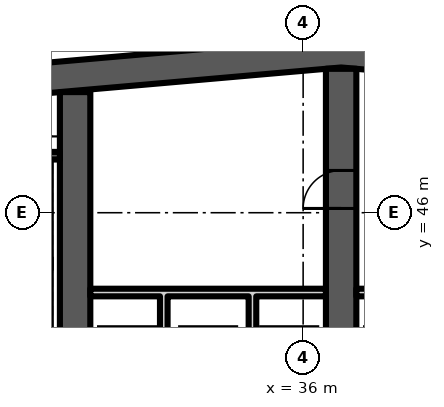
"""IFC4 building model, lengths in metres.
Left out: names, types, materials, properties, quantities, classifications, styles, units other than length and angle.
Written with IfcOpenShell. Run it as: python <this file> out.ifc"""

import sys

from ifc_helpers import new_model, si_unit, direction, frame, frame_2d, origin, place, context, subcontext, project, spatial, polyline, rectangle, outline, extrude, element, fill, save


model = new_model("IFC4")
c1 = context("Model", 3, precision=1e-05, world=origin(), true_north=direction((0.0, 1.0)))
c2 = subcontext(c1, "Body", "Model", "MODEL_VIEW")
j1 = project(units=[si_unit("LENGTHUNIT", "METRE"), si_unit("PLANEANGLEUNIT", "RADIAN")], contexts=[c1])
p1 = place(None, origin())
s1 = spatial("IfcSite", under=j1, at=p1, CompositionType="ELEMENT")
p2 = place(p1, origin())
s2 = spatial("IfcBuilding", under=s1, at=p2, CompositionType="ELEMENT")
p3 = place(p2, frame((0.0, 0.0, 151.9)))
s3 = spatial("IfcBuildingStorey", under=s2, at=p3, CompositionType="ELEMENT", Elevation=151.9)
p4 = place(p3, origin())
e1 = element("IfcWall", 1, at=p4, inside=s3, PredefinedType="SHEAR", context=c2, shape_type="SweptSolid", body=[
    extrude(outline(polyline([(16.0, 47.984), (37.0, 49.822), (58.0, 47.984), (58.0, 48.787), (37.0, 50.625), (16.0, 48.787), (16.0, 47.984)])), origin(), (0.0, 0.0, 1.0), 3.6),
])
p5 = place(p3, frame((30.0, 34.8, 0.0), z_axis=(0.0, 0.0, 1.0), x_axis=(0.0, 1.0, 0.0)))
e2 = element("IfcWall", 2, at=p5, inside=s3, PredefinedType="SHEAR", context=c2, shape_type="SweptSolid", body=[
    extrude(rectangle(XDim=14.374, YDim=0.8, at=frame_2d((7.187, 0.0))), origin(), (0.0, 0.0, 1.0), 3.6),
])
p6 = place(p5, frame((3.6, 0.0, 0.0)))
e3 = element("IfcOpeningElement", 3, at=p6, cuts=e2, PredefinedType="OPENING", context=c2, shape_type="SweptSolid", body=[
    extrude(rectangle(XDim=1.1, YDim=2.1, at=frame_2d((0.55, 1.05))), frame((0.0, 0.41, 0.0), z_axis=(0.0, -1.0, 0.0), x_axis=(1.0, 0.0, 0.0)), (0.0, 0.0, 1.0), 0.82),
])
p7 = place(p3, frame((37.0, 34.8, 0.0), z_axis=(0.0, 0.0, 1.0), x_axis=(0.0, 1.0, 0.0)))
e4 = element("IfcWall", 4, at=p7, inside=s3, PredefinedType="SHEAR", context=c2, shape_type="SweptSolid", body=[
    extrude(rectangle(XDim=14.987, YDim=0.8, at=frame_2d((7.493, 0.0))), origin(), (0.0, 0.0, 1.0), 3.6),
])
p8 = place(p7, frame((11.312, 0.0, 0.0)))
e5 = element("IfcOpeningElement", 5, at=p8, cuts=e4, PredefinedType="OPENING", context=c2, shape_type="SweptSolid", body=[
    extrude(rectangle(XDim=1.0, YDim=2.1, at=frame_2d((0.5, 1.05))), frame((0.0, 0.41, 0.0), z_axis=(0.0, -1.0, 0.0), x_axis=(1.0, 0.0, 0.0)), (0.0, 0.0, 1.0), 0.82),
])
p9 = place(p7, frame((3.6, 0.0, 0.0)))
e6 = element("IfcOpeningElement", 6, at=p9, cuts=e4, PredefinedType="OPENING", context=c2, shape_type="SweptSolid", body=[
    extrude(rectangle(XDim=1.1, YDim=2.1, at=frame_2d((0.55, 1.05))), frame((0.0, 0.41, 0.0), z_axis=(0.0, -1.0, 0.0), x_axis=(1.0, 0.0, 0.0)), (0.0, 0.0, 1.0), 0.82),
])
p10 = place(p3, frame((25.75, 47.5, 0.0), z_axis=(0.0, 0.0, 1.0), x_axis=(1.0, 0.0, 0.0)))
e7 = element("IfcWall", 7, at=p10, inside=s3, PredefinedType="SHEAR", context=c2, shape_type="SweptSolid", body=[
    extrude(rectangle(XDim=3.85, YDim=0.2, at=frame_2d((1.925, 0.0))), origin(), (0.0, 0.0, 1.0), 3.2),
])
p11 = place(p3, origin())
e8 = element("IfcWall", 8, at=p11, inside=s3, PredefinedType="PARTITIONING", context=c2, shape_type="SweptSolid", body=[
    extrude(outline(polyline([(32.433, 40.8), (32.233, 40.8), (32.233, 43.8), (30.4, 43.8), (30.4, 44.0), (36.6, 44.0), (36.6, 43.8), (34.767, 43.8), (34.767, 40.8), (34.567, 40.8), (34.567, 43.8), (32.433, 43.8), (32.433, 40.8)])), origin(), (0.0, 0.0, 1.0), 3.2),
])
p12 = place(p3, origin())
e9 = element("IfcWall", 9, at=p12, inside=s3, PredefinedType="PARTITIONING", context=c2, shape_type="SweptSolid", body=[
    extrude(outline(polyline([(39.433, 40.8), (39.233, 40.8), (39.233, 43.8), (37.4, 43.8), (37.4, 44.0), (43.6, 44.0), (43.6, 43.8), (41.767, 43.8), (41.767, 40.8), (41.567, 40.8), (41.567, 43.8), (39.433, 43.8), (39.433, 40.8)])), origin(), (0.0, 0.0, 1.0), 3.2),
])
p13 = place(p8, origin())
e10 = element("IfcDoor", 10, at=p13, inside=s3, OperationType="SINGLE_SWING_LEFT", PredefinedType="DOOR", context=c2, shape_type="SweptSolid", body=[
    extrude(rectangle(XDim=1.0, YDim=2.1, at=frame_2d((0.5, 1.05))), frame((0.0, 0.4, 0.0), z_axis=(0.0, -1.0, 0.0), x_axis=(1.0, 0.0, 0.0)), (0.0, 0.0, 1.0), 0.8),
])
fill(e5, e10)
save(model, sys.argv[1])
